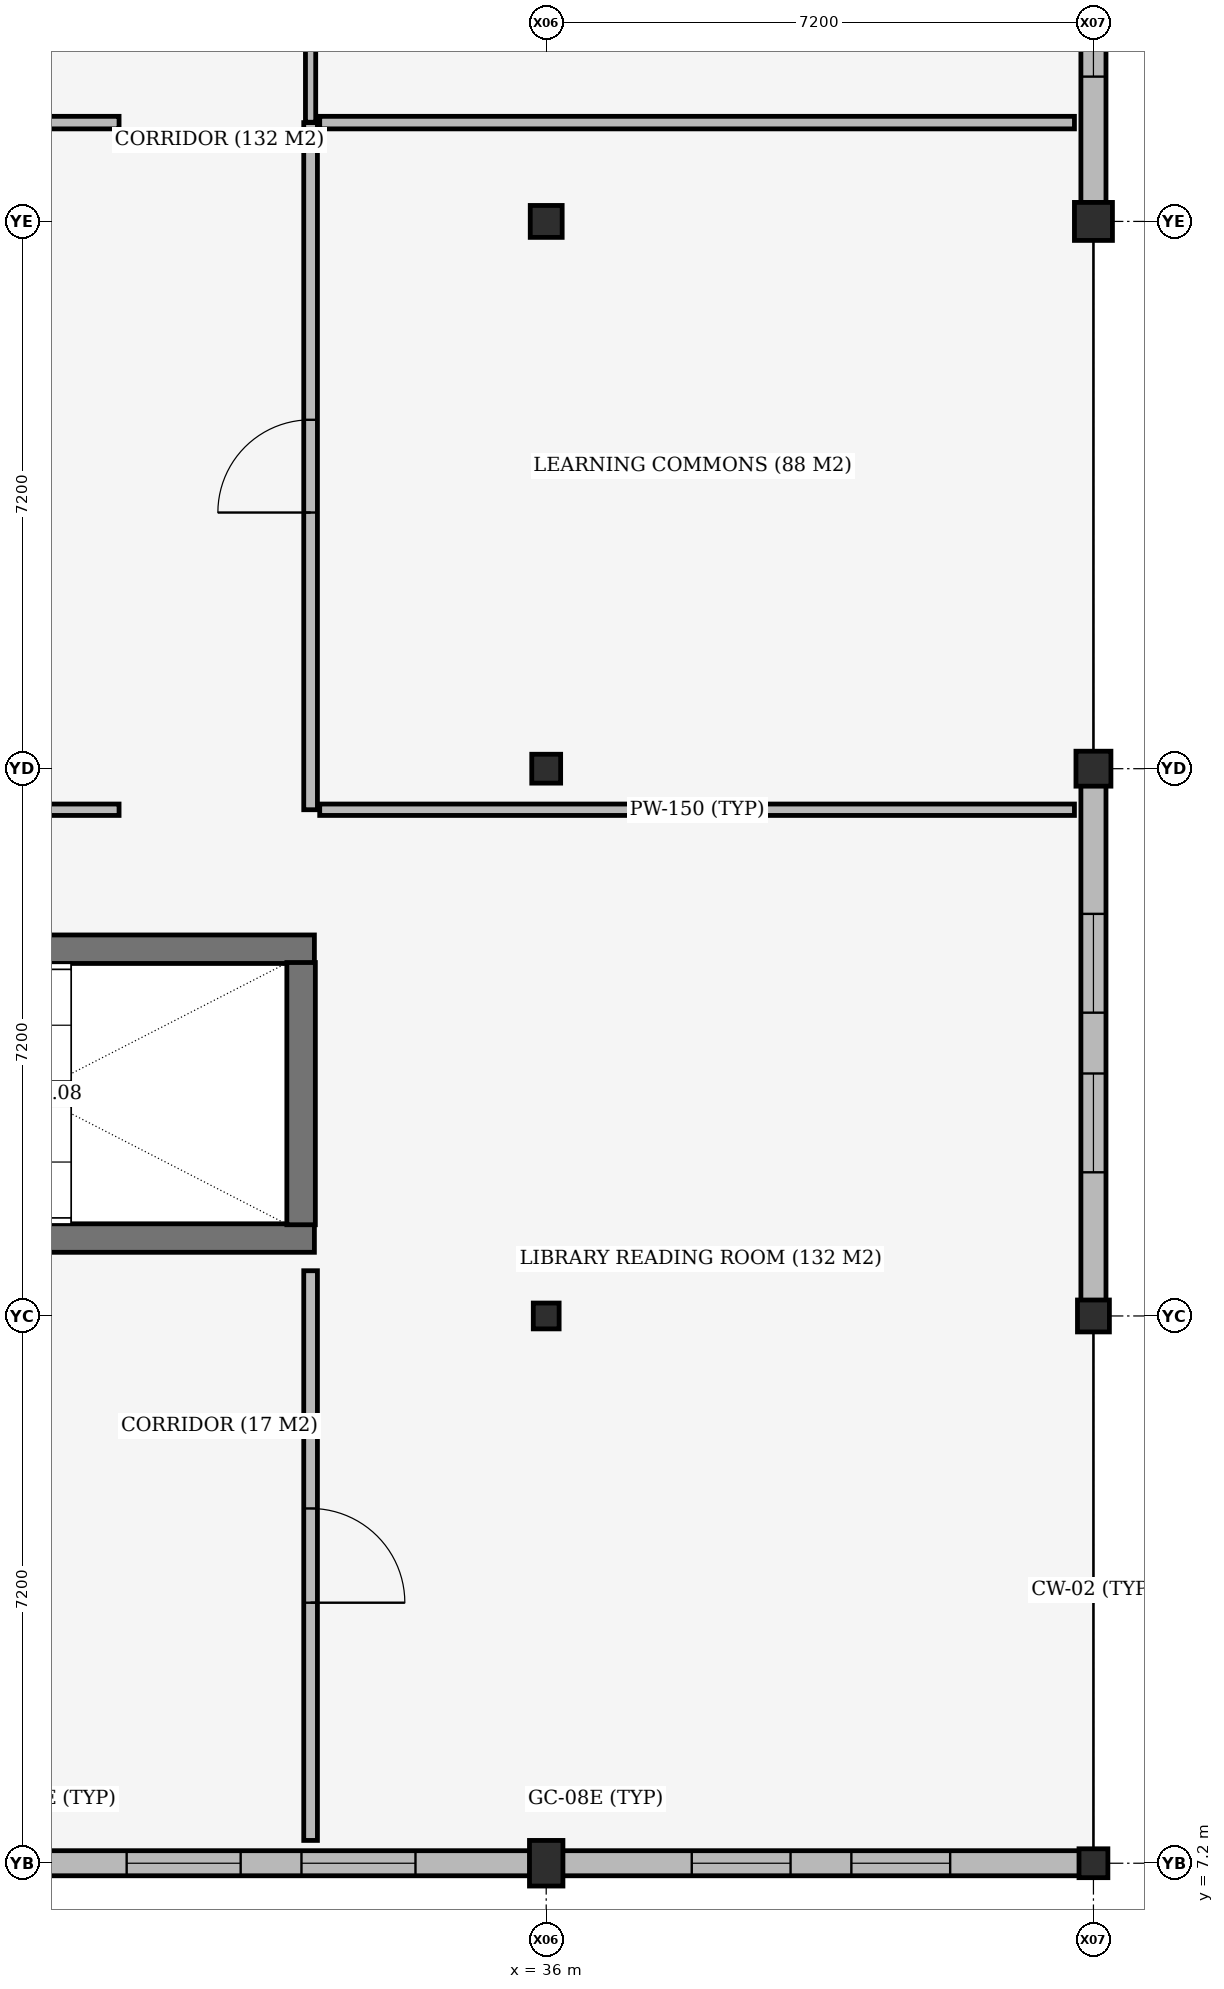
"""IFC4 building model, lengths in metres.
Left out: names, types, materials, properties, quantities, classifications, styles, units other than length and angle.
Written with IfcOpenShell. Run it as: python <this file> out.ifc"""

import sys

from ifc_helpers import new_model, si_unit, direction, frame, frame_2d, origin, origin_2d, place, context, subcontext, project, spatial, rectangle, extrude, element, fill, save


model = new_model("IFC4")
c1 = context("Model", 3, precision=1e-05, world=origin(), true_north=direction((0.0, 1.0)))
c2 = subcontext(c1, "Body", "Model", "MODEL_VIEW")
j1 = project(units=[si_unit("LENGTHUNIT", "METRE"), si_unit("PLANEANGLEUNIT", "RADIAN")], contexts=[c1])
p1 = place(None, origin())
s1 = spatial("IfcSite", under=j1, at=p1, CompositionType="ELEMENT")
p2 = place(p1, origin())
s2 = spatial("IfcBuilding", under=s1, at=p2, CompositionType="ELEMENT")
p3 = place(p2, frame((0.0, 0.0, 18.0)))
s3 = spatial("IfcBuildingStorey", under=s2, at=p3, CompositionType="ELEMENT", Elevation=18.0)
p4 = place(p3, frame((36.0, 7.2, 0.0), z_axis=(0.0, 0.0, 1.0), x_axis=(1.0, 0.0, 0.0)))
e1 = element("IfcColumn", 1, at=p4, inside=s3, PredefinedType="COLUMN", context=c2, shape_type="SweptSolid", body=[
    extrude(rectangle(XDim=0.44, YDim=0.6, at=origin_2d()), origin(), (0.0, 0.0, 1.0), 3.935),
])
p5 = place(p3, frame((36.0, 14.4, 0.0), z_axis=(0.0, 0.0, 1.0), x_axis=(1.0, 0.0, 0.0)))
e2 = element("IfcColumn", 2, at=p5, inside=s3, PredefinedType="COLUMN", context=c2, shape_type="SweptSolid", body=[
    extrude(rectangle(XDim=0.34, YDim=0.34, at=origin_2d()), origin(), (0.0, 0.0, 1.0), 3.935),
])
p6 = place(p3, frame((36.0, 21.6, 0.0), z_axis=(0.0, 0.0, 1.0), x_axis=(1.0, 0.0, 0.0)))
e3 = element("IfcColumn", 3, at=p6, inside=s3, PredefinedType="COLUMN", context=c2, shape_type="SweptSolid", body=[
    extrude(rectangle(XDim=0.38, YDim=0.38, at=origin_2d()), origin(), (0.0, 0.0, 1.0), 3.935),
])
p7 = place(p3, frame((36.0, 28.8, 0.0), z_axis=(0.0, 0.0, 1.0), x_axis=(1.0, 0.0, 0.0)))
e4 = element("IfcColumn", 4, at=p7, inside=s3, PredefinedType="COLUMN", context=c2, shape_type="SweptSolid", body=[
    extrude(rectangle(XDim=0.42, YDim=0.42, at=origin_2d()), origin(), (0.0, 0.0, 1.0), 3.935),
])
p8 = place(p3, frame((43.2, 7.2, 0.0), z_axis=(0.0, 0.0, 1.0), x_axis=(1.0, 0.0, 0.0)))
e5 = element("IfcColumn", 5, at=p8, inside=s3, PredefinedType="COLUMN", context=c2, shape_type="SweptSolid", body=[
    extrude(rectangle(XDim=0.38, YDim=0.38, at=origin_2d()), origin(), (0.0, 0.0, 1.0), 3.96),
])
p9 = place(p3, frame((43.2, 14.4, 0.0), z_axis=(0.0, 0.0, 1.0), x_axis=(1.0, 0.0, 0.0)))
e6 = element("IfcColumn", 6, at=p9, inside=s3, PredefinedType="COLUMN", context=c2, shape_type="SweptSolid", body=[
    extrude(rectangle(XDim=0.42, YDim=0.42, at=origin_2d()), origin(), (0.0, 0.0, 1.0), 3.96),
])
p10 = place(p3, frame((43.2, 21.6, 0.0), z_axis=(0.0, 0.0, 1.0), x_axis=(1.0, 0.0, 0.0)))
e7 = element("IfcColumn", 7, at=p10, inside=s3, PredefinedType="COLUMN", context=c2, shape_type="SweptSolid", body=[
    extrude(rectangle(XDim=0.46, YDim=0.46, at=origin_2d()), origin(), (0.0, 0.0, 1.0), 3.96),
])
p11 = place(p3, frame((43.2, 28.8, 0.0), z_axis=(0.0, 0.0, 1.0), x_axis=(1.0, 0.0, 0.0)))
e8 = element("IfcColumn", 8, at=p11, inside=s3, PredefinedType="COLUMN", context=c2, shape_type="SweptSolid", body=[
    extrude(rectangle(XDim=0.5, YDim=0.5, at=origin_2d()), origin(), (0.0, 0.0, 1.0), 3.96),
])
for number, where, z_axis, x_axis in (
    (9, (23.85, 15.425, 0.0), (0.0, 0.0, 1.0), (1.0, 0.0, 0.0)),
    (10, (32.95, 19.225, 0.0), (0.0, 0.0, 1.0), (-1.0, 0.0, 0.0)),
):
    element("IfcWall", number, at=place(p3, frame(where, z_axis=z_axis, x_axis=x_axis)), inside=s3, PredefinedType="SHEAR", context=c2, shape_type="SweptSolid", body=[
        extrude(rectangle(XDim=9.1, YDim=0.375, at=frame_2d((4.55, 0.0))), origin(), (0.0, 0.0, 1.0), 3.935),
    ])
p12 = place(p3, frame((32.775, 15.6, 0.0), z_axis=(0.0, 0.0, 1.0), x_axis=(0.0, 1.0, 0.0)))
e11 = element("IfcWall", 11, at=p12, inside=s3, PredefinedType="SHEAR", context=c2, shape_type="SweptSolid", body=[
    extrude(rectangle(XDim=3.45, YDim=0.375, at=frame_2d((1.725, 0.0))), origin(), (0.0, 0.0, 1.0), 3.935),
])
p13 = place(p3, frame((35.788, 7.2, 0.0), z_axis=(0.0, 0.0, 1.0), x_axis=(-1.0, 0.0, 0.0)))
e12 = element("IfcWall", 12, at=p13, inside=s3, PredefinedType="STANDARD", context=c2, shape_type="SweptSolid", body=[
    extrude(rectangle(XDim=6.816, YDim=0.33, at=frame_2d((3.408, 0.0))), origin(), (0.0, 0.0, 1.0), 3.355),
])
p14 = place(p13, frame((1.508, 0.0, 0.95)))
e13 = element("IfcOpeningElement", 13, at=p14, cuts=e12, PredefinedType="OPENING", context=c2, shape_type="SweptSolid", body=[
    extrude(rectangle(XDim=1.5, YDim=1.8, at=frame_2d((0.75, 0.9))), frame((0.0, 0.175, 0.0), z_axis=(0.0, -1.0, 0.0), x_axis=(1.0, 0.0, 0.0)), (0.0, 0.0, 1.0), 0.35),
])
p15 = place(p13, frame((3.808, 0.0, 0.95)))
e14 = element("IfcOpeningElement", 14, at=p15, cuts=e12, PredefinedType="OPENING", context=c2, shape_type="SweptSolid", body=[
    extrude(rectangle(XDim=1.5, YDim=1.8, at=frame_2d((0.75, 0.9))), frame((0.0, 0.175, 0.0), z_axis=(0.0, -1.0, 0.0), x_axis=(1.0, 0.0, 0.0)), (0.0, 0.0, 1.0), 0.35),
])
p16 = place(p3, frame((43.018, 7.2, 0.0), z_axis=(0.0, 0.0, 1.0), x_axis=(-1.0, 0.0, 0.0)))
e15 = element("IfcWall", 15, at=p16, inside=s3, PredefinedType="STANDARD", context=c2, shape_type="SweptSolid", body=[
    extrude(rectangle(XDim=6.806, YDim=0.33, at=frame_2d((3.403, 0.0))), origin(), (0.0, 0.0, 1.0), 3.935),
])
p17 = place(p16, frame((1.703, 0.0, 0.95)))
e16 = element("IfcOpeningElement", 16, at=p17, cuts=e15, PredefinedType="OPENING", context=c2, shape_type="SweptSolid", body=[
    extrude(rectangle(XDim=1.3, YDim=1.8, at=frame_2d((0.65, 0.9))), frame((0.0, 0.175, 0.0), z_axis=(0.0, -1.0, 0.0), x_axis=(1.0, 0.0, 0.0)), (0.0, 0.0, 1.0), 0.35),
])
p18 = place(p16, frame((3.803, 0.0, 0.95)))
e17 = element("IfcOpeningElement", 17, at=p18, cuts=e15, PredefinedType="OPENING", context=c2, shape_type="SweptSolid", body=[
    extrude(rectangle(XDim=1.3, YDim=1.8, at=frame_2d((0.65, 0.9))), frame((0.0, 0.175, 0.0), z_axis=(0.0, -1.0, 0.0), x_axis=(1.0, 0.0, 0.0)), (0.0, 0.0, 1.0), 0.35),
])
p19 = place(p3, frame((43.2, 21.378, 0.0), z_axis=(0.0, 0.0, 1.0), x_axis=(0.0, -1.0, 0.0)))
e18 = element("IfcWall", 18, at=p19, inside=s3, PredefinedType="STANDARD", context=c2, shape_type="SweptSolid", body=[
    extrude(rectangle(XDim=6.776, YDim=0.33, at=frame_2d((3.388, 0.0))), origin(), (0.0, 0.0, 1.0), 3.935),
])
p20 = place(p19, frame((1.688, 0.0, 0.95)))
e19 = element("IfcOpeningElement", 19, at=p20, cuts=e18, PredefinedType="OPENING", context=c2, shape_type="SweptSolid", body=[
    extrude(rectangle(XDim=1.3, YDim=1.8, at=frame_2d((0.65, 0.9))), frame((0.0, 0.175, 0.0), z_axis=(0.0, -1.0, 0.0), x_axis=(1.0, 0.0, 0.0)), (0.0, 0.0, 1.0), 0.35),
])
p21 = place(p19, frame((3.788, 0.0, 0.95)))
e20 = element("IfcOpeningElement", 20, at=p21, cuts=e18, PredefinedType="OPENING", context=c2, shape_type="SweptSolid", body=[
    extrude(rectangle(XDim=1.3, YDim=1.8, at=frame_2d((0.65, 0.9))), frame((0.0, 0.175, 0.0), z_axis=(0.0, -1.0, 0.0), x_axis=(1.0, 0.0, 0.0)), (0.0, 0.0, 1.0), 0.35),
])
p22 = place(p3, frame((43.2, 35.768, 0.0), z_axis=(0.0, 0.0, 1.0), x_axis=(0.0, -1.0, 0.0)))
e21 = element("IfcWall", 21, at=p22, inside=s3, PredefinedType="STANDARD", context=c2, shape_type="SweptSolid", body=[
    extrude(rectangle(XDim=6.726, YDim=0.33, at=frame_2d((3.363, 0.0))), origin(), (0.0, 0.0, 1.0), 3.935),
])
p23 = place(p22, frame((1.663, 0.0, 0.95)))
e22 = element("IfcOpeningElement", 22, at=p23, cuts=e21, PredefinedType="OPENING", context=c2, shape_type="SweptSolid", body=[
    extrude(rectangle(XDim=1.3, YDim=1.8, at=frame_2d((0.65, 0.9))), frame((0.0, 0.175, 0.0), z_axis=(0.0, -1.0, 0.0), x_axis=(1.0, 0.0, 0.0)), (0.0, 0.0, 1.0), 0.35),
])
p24 = place(p22, frame((3.763, 0.0, 0.95)))
e23 = element("IfcOpeningElement", 23, at=p24, cuts=e21, PredefinedType="OPENING", context=c2, shape_type="SweptSolid", body=[
    extrude(rectangle(XDim=1.3, YDim=1.8, at=frame_2d((0.65, 0.9))), frame((0.0, 0.175, 0.0), z_axis=(0.0, -1.0, 0.0), x_axis=(1.0, 0.0, 0.0)), (0.0, 0.0, 1.0), 0.35),
])
p25 = place(p3, frame((15.29, 21.06, 0.0), z_axis=(0.0, 0.0, 1.0), x_axis=(1.0, 0.0, 0.0)))
e24 = element("IfcWall", 24, at=p25, inside=s3, PredefinedType="PARTITIONING", context=c2, shape_type="SweptSolid", body=[
    extrude(rectangle(XDim=15.09, YDim=0.15, at=frame_2d((7.545, 0.0))), origin(), (0.0, 0.0, 1.0), 3.295),
])
p26 = place(p3, frame((11.47, 30.1, 0.0), z_axis=(0.0, 0.0, 1.0), x_axis=(1.0, 0.0, 0.0)))
e25 = element("IfcWall", 25, at=p26, inside=s3, PredefinedType="PARTITIONING", context=c2, shape_type="SweptSolid", body=[
    extrude(rectangle(XDim=18.91, YDim=0.165, at=frame_2d((9.455, 0.0))), origin(), (0.0, 0.0, 1.0), 3.195),
])
p27 = place(p3, frame((32.9, 7.5, 0.0), z_axis=(0.0, 0.0, 1.0), x_axis=(0.0, 1.0, 0.0)))
e26 = element("IfcWall", 26, at=p27, inside=s3, PredefinedType="PARTITIONING", context=c2, shape_type="SweptSolid", body=[
    extrude(rectangle(XDim=7.495, YDim=0.18, at=frame_2d((3.748, 0.0))), origin(), (0.0, 0.0, 1.0), 3.355),
])
p28 = place(p27, frame((3.127, 0.0, 0.0)))
e27 = element("IfcOpeningElement", 27, at=p28, cuts=e26, PredefinedType="OPENING", context=c2, shape_type="SweptSolid", body=[
    extrude(rectangle(XDim=1.24, YDim=2.25, at=frame_2d((0.62, 1.125))), frame((0.0, 0.1, 0.0), z_axis=(0.0, -1.0, 0.0), x_axis=(1.0, 0.0, 0.0)), (0.0, 0.0, 1.0), 0.2),
])
p29 = place(p3, frame((33.02, 21.06, 0.0), z_axis=(0.0, 0.0, 1.0), x_axis=(1.0, 0.0, 0.0)))
e28 = element("IfcWall", 28, at=p29, inside=s3, PredefinedType="PARTITIONING", context=c2, shape_type="SweptSolid", body=[
    extrude(rectangle(XDim=9.93, YDim=0.15, at=frame_2d((4.965, 0.0))), origin(), (0.0, 0.0, 1.0), 3.295),
])
p30 = place(p3, frame((32.9, 21.06, 0.0), z_axis=(0.0, 0.0, 1.0), x_axis=(0.0, 1.0, 0.0)))
e29 = element("IfcWall", 29, at=p30, inside=s3, PredefinedType="PARTITIONING", context=c2, shape_type="SweptSolid", body=[
    extrude(rectangle(XDim=9.04, YDim=0.18, at=frame_2d((4.52, 0.0))), origin(), (0.0, 0.0, 1.0), 3.355),
])
p31 = place(p30, frame((3.91, 0.0, 0.0)))
e30 = element("IfcOpeningElement", 30, at=p31, cuts=e29, PredefinedType="OPENING", context=c2, shape_type="SweptSolid", body=[
    extrude(rectangle(XDim=1.22, YDim=2.25, at=frame_2d((0.61, 1.125))), frame((0.0, 0.1, 0.0), z_axis=(0.0, -1.0, 0.0), x_axis=(1.0, 0.0, 0.0)), (0.0, 0.0, 1.0), 0.2),
])
p32 = place(p3, frame((33.02, 30.1, 0.0), z_axis=(0.0, 0.0, 1.0), x_axis=(1.0, 0.0, 0.0)))
e31 = element("IfcWall", 31, at=p32, inside=s3, PredefinedType="PARTITIONING", context=c2, shape_type="SweptSolid", body=[
    extrude(rectangle(XDim=9.93, YDim=0.165, at=frame_2d((4.965, 0.0))), origin(), (0.0, 0.0, 1.0), 3.195),
])
p33 = place(p3, frame((32.9, 30.105, 0.0), z_axis=(0.0, 0.0, 1.0), x_axis=(0.0, 1.0, 0.0)))
e32 = element("IfcWall", 32, at=p33, inside=s3, PredefinedType="PARTITIONING", context=c2, shape_type="SweptSolid", body=[
    extrude(rectangle(XDim=11.295, YDim=0.135, at=frame_2d((5.647, 0.0))), origin(), (0.0, 0.0, 1.0), 3.355),
])
p34 = place(p33, frame((5.067, 0.0, 0.0)))
e33 = element("IfcOpeningElement", 33, at=p34, cuts=e32, PredefinedType="OPENING", context=c2, shape_type="SweptSolid", body=[
    extrude(rectangle(XDim=1.16, YDim=2.2, at=frame_2d((0.58, 1.1))), frame((0.0, 0.077, 0.0), z_axis=(0.0, -1.0, 0.0), x_axis=(1.0, 0.0, 0.0)), (0.0, 0.0, 1.0), 0.155),
])
p35 = place(p14, origin())
e34 = element("IfcWindow", 34, at=p35, inside=s3, PartitioningType="DOUBLE_PANEL_VERTICAL", PredefinedType="WINDOW", context=c2, shape_type="SweptSolid", body=[
    extrude(rectangle(XDim=1.5, YDim=1.8, at=frame_2d((0.75, 0.9))), frame((0.0, 0.03, 0.0), z_axis=(0.0, -1.0, 0.0), x_axis=(1.0, 0.0, 0.0)), (0.0, 0.0, 1.0), 0.06),
])
fill(e13, e34)
p36 = place(p15, origin())
e35 = element("IfcWindow", 35, at=p36, inside=s3, PartitioningType="DOUBLE_PANEL_VERTICAL", PredefinedType="WINDOW", context=c2, shape_type="SweptSolid", body=[
    extrude(rectangle(XDim=1.5, YDim=1.8, at=frame_2d((0.75, 0.9))), frame((0.0, 0.03, 0.0), z_axis=(0.0, -1.0, 0.0), x_axis=(1.0, 0.0, 0.0)), (0.0, 0.0, 1.0), 0.06),
])
fill(e14, e35)
p37 = place(p17, origin())
e36 = element("IfcWindow", 36, at=p37, inside=s3, PartitioningType="DOUBLE_PANEL_VERTICAL", PredefinedType="WINDOW", context=c2, shape_type="SweptSolid", body=[
    extrude(rectangle(XDim=1.3, YDim=1.8, at=frame_2d((0.65, 0.9))), frame((0.0, 0.03, 0.0), z_axis=(0.0, -1.0, 0.0), x_axis=(1.0, 0.0, 0.0)), (0.0, 0.0, 1.0), 0.06),
])
fill(e16, e36)
p38 = place(p18, origin())
e37 = element("IfcWindow", 37, at=p38, inside=s3, PartitioningType="DOUBLE_PANEL_VERTICAL", PredefinedType="WINDOW", context=c2, shape_type="SweptSolid", body=[
    extrude(rectangle(XDim=1.3, YDim=1.8, at=frame_2d((0.65, 0.9))), frame((0.0, 0.03, 0.0), z_axis=(0.0, -1.0, 0.0), x_axis=(1.0, 0.0, 0.0)), (0.0, 0.0, 1.0), 0.06),
])
fill(e17, e37)
p39 = place(p20, origin())
e38 = element("IfcWindow", 38, at=p39, inside=s3, PartitioningType="DOUBLE_PANEL_VERTICAL", PredefinedType="WINDOW", context=c2, shape_type="SweptSolid", body=[
    extrude(rectangle(XDim=1.3, YDim=1.8, at=frame_2d((0.65, 0.9))), frame((0.0, 0.03, 0.0), z_axis=(0.0, -1.0, 0.0), x_axis=(1.0, 0.0, 0.0)), (0.0, 0.0, 1.0), 0.06),
])
fill(e19, e38)
p40 = place(p21, origin())
e39 = element("IfcWindow", 39, at=p40, inside=s3, PartitioningType="DOUBLE_PANEL_VERTICAL", PredefinedType="WINDOW", context=c2, shape_type="SweptSolid", body=[
    extrude(rectangle(XDim=1.3, YDim=1.8, at=frame_2d((0.65, 0.9))), frame((0.0, 0.03, 0.0), z_axis=(0.0, -1.0, 0.0), x_axis=(1.0, 0.0, 0.0)), (0.0, 0.0, 1.0), 0.06),
])
fill(e20, e39)
p41 = place(p24, origin())
e40 = element("IfcWindow", 40, at=p41, inside=s3, PartitioningType="DOUBLE_PANEL_VERTICAL", PredefinedType="WINDOW", context=c2, shape_type="SweptSolid", body=[
    extrude(rectangle(XDim=1.3, YDim=1.8, at=frame_2d((0.65, 0.9))), frame((0.0, 0.03, 0.0), z_axis=(0.0, -1.0, 0.0), x_axis=(1.0, 0.0, 0.0)), (0.0, 0.0, 1.0), 0.06),
])
fill(e23, e40)
p42 = place(p28, origin())
e41 = element("IfcDoor", 41, at=p42, inside=s3, OperationType="SINGLE_SWING_RIGHT", PredefinedType="DOOR", context=c2, shape_type="SweptSolid", body=[
    extrude(rectangle(XDim=1.24, YDim=2.25, at=frame_2d((0.62, 1.125))), frame((0.0, 0.025, 0.0), z_axis=(0.0, -1.0, 0.0), x_axis=(1.0, 0.0, 0.0)), (0.0, 0.0, 1.0), 0.05),
])
fill(e27, e41)
p43 = place(p31, origin())
e42 = element("IfcDoor", 42, at=p43, inside=s3, OperationType="SINGLE_SWING_LEFT", PredefinedType="DOOR", context=c2, shape_type="SweptSolid", body=[
    extrude(rectangle(XDim=1.22, YDim=2.25, at=frame_2d((0.61, 1.125))), frame((0.0, 0.025, 0.0), z_axis=(0.0, -1.0, 0.0), x_axis=(1.0, 0.0, 0.0)), (0.0, 0.0, 1.0), 0.05),
])
fill(e30, e42)
save(model, sys.argv[1])
